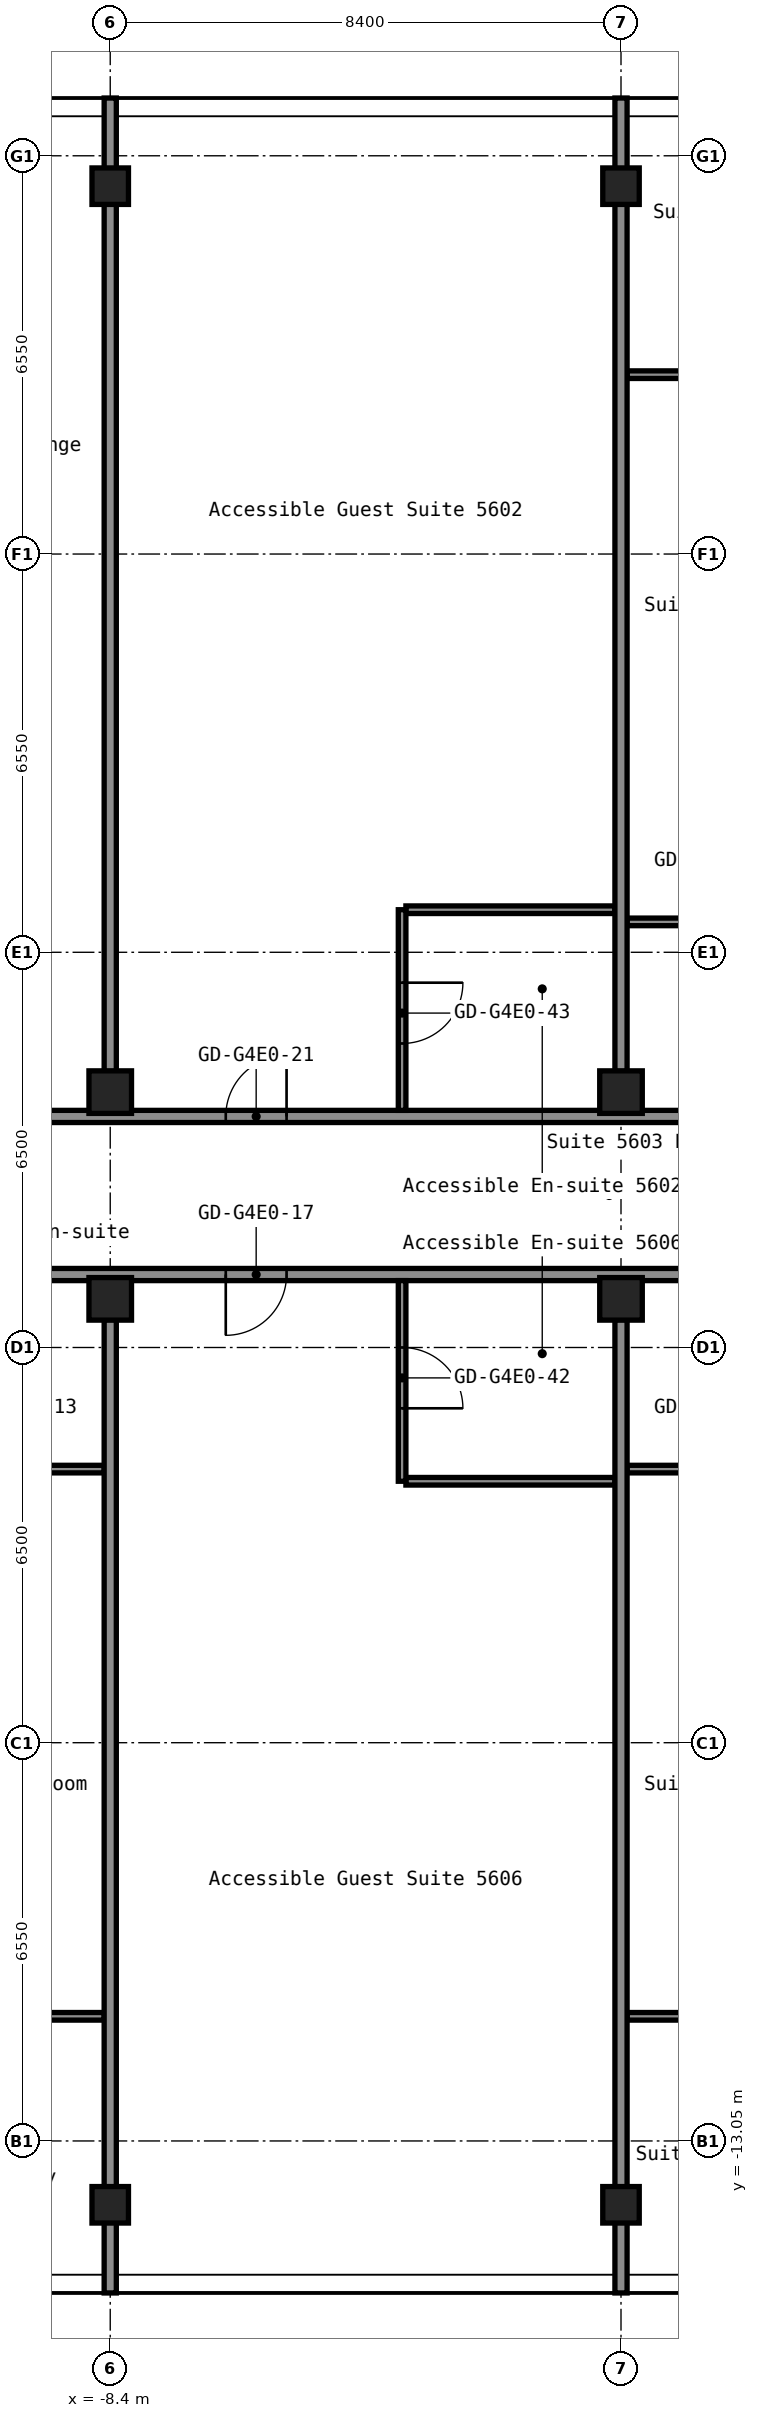
"""IFC4 building model, lengths in metres.
Left out: names, types, materials, properties, quantities, classifications, styles, units other than length and angle.
Written with IfcOpenShell. Run it as: python <this file> out.ifc"""

import sys

from ifc_helpers import new_model, si_unit, direction, frame, frame_2d, origin, origin_2d, place, context, subcontext, project, spatial, rectangle, hollow_rectangle, extrude, element, fill, save


model = new_model("IFC4")
c1 = context("Model", 3, precision=1e-05, world=origin(), true_north=direction((0.0, 1.0)))
c2 = subcontext(c1, "Body", "Model", "MODEL_VIEW")
j1 = project(units=[si_unit("LENGTHUNIT", "METRE"), si_unit("PLANEANGLEUNIT", "RADIAN")], contexts=[c1])
p1 = place(None, origin())
s1 = spatial("IfcSite", under=j1, at=p1, CompositionType="ELEMENT")
p2 = place(p1, origin())
s2 = spatial("IfcBuilding", under=s1, at=p2, CompositionType="ELEMENT")
p3 = place(p2, frame((0.0, 0.0, 199.4)))
s3 = spatial("IfcBuildingStorey", under=s2, at=p3, CompositionType="ELEMENT", Elevation=199.4)
p4 = place(p3, frame((-8.4, -14.1, 0.0), z_axis=(0.0, 0.0, 1.0), x_axis=(1.0, 0.0, 0.0)))
e1 = element("IfcColumn", 1, at=p4, inside=s3, PredefinedType="COLUMN", context=c2, shape_type="SweptSolid", body=[
    extrude(hollow_rectangle(XDim=0.6, YDim=0.6, WallThickness=0.025, InnerFilletRadius=0.038, OuterFilletRadius=0.062, at=origin_2d()), origin(), (0.0, 0.0, 1.0), 2.75),
])
for number, where, z_axis, x_axis in (
    (2, (-8.4, 0.8, 0.0), (0.0, 0.0, 1.0), (1.0, 0.0, 0.0)),
    (3, (-8.4, 4.2, 0.0), (0.0, 0.0, 1.0), (1.0, 0.0, 0.0)),
):
    element("IfcColumn", number, at=place(p3, frame(where, z_axis=z_axis, x_axis=x_axis)), inside=s3, PredefinedType="COLUMN", context=c2, shape_type="SweptSolid", body=[
        extrude(hollow_rectangle(XDim=0.7, YDim=0.7, WallThickness=0.028, at=origin_2d()), origin(), (0.0, 0.0, 1.0), 2.75),
    ])
for number, where, z_axis, x_axis in (
    (4, (-8.4, 19.1, 0.0), (0.0, 0.0, 1.0), (1.0, 0.0, 0.0)),
    (5, (0.0, -14.1, 0.0), (0.0, 0.0, 1.0), (1.0, 0.0, 0.0)),
):
    element("IfcColumn", number, at=place(p3, frame(where, z_axis=z_axis, x_axis=x_axis)), inside=s3, PredefinedType="COLUMN", context=c2, shape_type="SweptSolid", body=[
        extrude(hollow_rectangle(XDim=0.6, YDim=0.6, WallThickness=0.025, InnerFilletRadius=0.038, OuterFilletRadius=0.062, at=origin_2d()), origin(), (0.0, 0.0, 1.0), 2.75),
    ])
for number, where, z_axis, x_axis in (
    (6, (0.0, 0.8, 0.0), (0.0, 0.0, 1.0), (1.0, 0.0, 0.0)),
    (7, (0.0, 4.2, 0.0), (0.0, 0.0, 1.0), (1.0, 0.0, 0.0)),
):
    element("IfcColumn", number, at=place(p3, frame(where, z_axis=z_axis, x_axis=x_axis)), inside=s3, PredefinedType="COLUMN", context=c2, shape_type="SweptSolid", body=[
        extrude(hollow_rectangle(XDim=0.7, YDim=0.7, WallThickness=0.028, at=origin_2d()), origin(), (0.0, 0.0, 1.0), 2.75),
    ])
p5 = place(p3, frame((0.0, 19.1, 0.0), z_axis=(0.0, 0.0, 1.0), x_axis=(1.0, 0.0, 0.0)))
e8 = element("IfcColumn", 8, at=p5, inside=s3, PredefinedType="COLUMN", context=c2, shape_type="SweptSolid", body=[
    extrude(hollow_rectangle(XDim=0.6, YDim=0.6, WallThickness=0.025, InnerFilletRadius=0.038, OuterFilletRadius=0.062, at=origin_2d()), origin(), (0.0, 0.0, 1.0), 2.75),
])
p6 = place(p3, frame((-12.538, -11.0, 0.0), z_axis=(0.0, 0.0, 1.0), x_axis=(1.0, 0.0, 0.0)))
e9 = element("IfcWall", 9, at=p6, inside=s3, PredefinedType="PARTITIONING", context=c2, shape_type="SweptSolid", body=[
    extrude(rectangle(XDim=4.038, YDim=0.125, at=frame_2d((2.019, 0.0))), origin(), (0.0, 0.0, 1.0), 2.75),
])
p7 = place(p6, frame((1.587, 0.0, 0.0)))
e10 = element("IfcOpeningElement", 10, at=p7, cuts=e9, PredefinedType="OPENING", context=c2, shape_type="SweptSolid", body=[
    extrude(rectangle(XDim=0.9, YDim=2.1, at=frame_2d((0.45, 1.05))), frame((0.0, 0.073, 0.0), z_axis=(0.0, -1.0, 0.0), x_axis=(1.0, 0.0, 0.0)), (0.0, 0.0, 1.0), 0.145),
])
p8 = place(p3, frame((0.1, -11.0, 0.0), z_axis=(0.0, 0.0, 1.0), x_axis=(1.0, 0.0, 0.0)))
e11 = element("IfcWall", 11, at=p8, inside=s3, PredefinedType="PARTITIONING", context=c2, shape_type="SweptSolid", body=[
    extrude(rectangle(XDim=4.037, YDim=0.125, at=frame_2d((2.019, 0.0))), origin(), (0.0, 0.0, 1.0), 2.75),
])
p9 = place(p8, frame((1.55, 0.0, 0.0)))
e12 = element("IfcOpeningElement", 12, at=p9, cuts=e11, PredefinedType="OPENING", context=c2, shape_type="SweptSolid", body=[
    extrude(rectangle(XDim=0.9, YDim=2.1, at=frame_2d((0.45, 1.05))), frame((0.0, 0.073, 0.0), z_axis=(0.0, -1.0, 0.0), x_axis=(1.0, 0.0, 0.0)), (0.0, 0.0, 1.0), 0.145),
])
p10 = place(p3, frame((-3.538, -2.2, 0.0), z_axis=(0.0, 0.0, 1.0), x_axis=(1.0, 0.0, 0.0)))
e13 = element("IfcWall", 13, at=p10, inside=s3, PredefinedType="PARTITIONING", context=c2, shape_type="SweptSolid", body=[
    extrude(rectangle(XDim=3.438, YDim=0.125, at=frame_2d((1.719, 0.0))), origin(), (0.0, 0.0, 1.0), 2.75),
])
p11 = place(p3, frame((-11.337, -2.0, 0.0), z_axis=(0.0, 0.0, 1.0), x_axis=(1.0, 0.0, 0.0)))
e14 = element("IfcWall", 14, at=p11, inside=s3, PredefinedType="PARTITIONING", context=c2, shape_type="SweptSolid", body=[
    extrude(rectangle(XDim=2.837, YDim=0.125, at=frame_2d((1.419, 0.0))), origin(), (0.0, 0.0, 1.0), 2.75),
])
p12 = place(p11, frame((1.038, 0.0, 0.0)))
e15 = element("IfcOpeningElement", 15, at=p12, cuts=e14, PredefinedType="OPENING", context=c2, shape_type="SweptSolid", body=[
    extrude(rectangle(XDim=0.8, YDim=2.1, at=frame_2d((0.4, 1.05))), frame((0.0, 0.073, 0.0), z_axis=(0.0, -1.0, 0.0), x_axis=(1.0, 0.0, 0.0)), (0.0, 0.0, 1.0), 0.145),
])
p13 = place(p3, frame((0.1, -2.0, 0.0), z_axis=(0.0, 0.0, 1.0), x_axis=(1.0, 0.0, 0.0)))
e16 = element("IfcWall", 16, at=p13, inside=s3, PredefinedType="PARTITIONING", context=c2, shape_type="SweptSolid", body=[
    extrude(rectangle(XDim=2.837, YDim=0.125, at=frame_2d((1.419, 0.0))), origin(), (0.0, 0.0, 1.0), 2.75),
])
p14 = place(p13, frame((1.0, 0.0, 0.0)))
e17 = element("IfcOpeningElement", 17, at=p14, cuts=e16, PredefinedType="OPENING", context=c2, shape_type="SweptSolid", body=[
    extrude(rectangle(XDim=0.8, YDim=2.1, at=frame_2d((0.4, 1.05))), frame((0.0, 0.073, 0.0), z_axis=(0.0, -1.0, 0.0), x_axis=(1.0, 0.0, 0.0)), (0.0, 0.0, 1.0), 0.145),
])
p15 = place(p3, frame((-16.8, 1.2, 0.0), z_axis=(0.0, 0.0, 1.0), x_axis=(1.0, 0.0, 0.0)))
e18 = element("IfcWall", 18, at=p15, inside=s3, PredefinedType="PARTITIONING", context=c2, shape_type="SweptSolid", body=[
    extrude(rectangle(XDim=33.6, YDim=0.2, at=frame_2d((16.8, 0.0))), origin(), (0.0, 0.0, 1.0), 2.75),
])
p16 = place(p15, frame((1.6, 0.0, 0.0)))
e19 = element("IfcOpeningElement", 19, at=p16, cuts=e18, PredefinedType="OPENING", context=c2, shape_type="SweptSolid", body=[
    extrude(rectangle(XDim=1.0, YDim=2.1, at=frame_2d((0.5, 1.05))), frame((0.0, 0.11, 0.0), z_axis=(0.0, -1.0, 0.0), x_axis=(1.0, 0.0, 0.0)), (0.0, 0.0, 1.0), 0.22),
])
p17 = place(p15, frame((10.3, 0.0, 0.0)))
e20 = element("IfcOpeningElement", 20, at=p17, cuts=e18, PredefinedType="OPENING", context=c2, shape_type="SweptSolid", body=[
    extrude(rectangle(XDim=1.0, YDim=2.1, at=frame_2d((0.5, 1.05))), frame((0.0, 0.11, 0.0), z_axis=(0.0, -1.0, 0.0), x_axis=(1.0, 0.0, 0.0)), (0.0, 0.0, 1.0), 0.22),
])
p18 = place(p15, frame((22.6, 0.0, 0.0)))
e21 = element("IfcOpeningElement", 21, at=p18, cuts=e18, PredefinedType="OPENING", context=c2, shape_type="SweptSolid", body=[
    extrude(rectangle(XDim=1.0, YDim=2.1, at=frame_2d((0.5, 1.05))), frame((0.0, 0.11, 0.0), z_axis=(0.0, -1.0, 0.0), x_axis=(1.0, 0.0, 0.0)), (0.0, 0.0, 1.0), 0.22),
])
p19 = place(p15, frame((31.0, 0.0, 0.0)))
e22 = element("IfcOpeningElement", 22, at=p19, cuts=e18, PredefinedType="OPENING", context=c2, shape_type="SweptSolid", body=[
    extrude(rectangle(XDim=1.0, YDim=2.1, at=frame_2d((0.5, 1.05))), frame((0.0, 0.11, 0.0), z_axis=(0.0, -1.0, 0.0), x_axis=(1.0, 0.0, 0.0)), (0.0, 0.0, 1.0), 0.22),
])
p20 = place(p3, frame((-16.8, 3.8, 0.0), z_axis=(0.0, 0.0, 1.0), x_axis=(1.0, 0.0, 0.0)))
e23 = element("IfcWall", 23, at=p20, inside=s3, PredefinedType="PARTITIONING", context=c2, shape_type="SweptSolid", body=[
    extrude(rectangle(XDim=33.6, YDim=0.2, at=frame_2d((16.8, 0.0))), origin(), (0.0, 0.0, 1.0), 2.75),
])
p21 = place(p20, frame((5.8, 0.0, 0.0)))
e24 = element("IfcOpeningElement", 24, at=p21, cuts=e23, PredefinedType="OPENING", context=c2, shape_type="SweptSolid", body=[
    extrude(rectangle(XDim=1.0, YDim=2.1, at=frame_2d((0.5, 1.05))), frame((0.0, 0.11, 0.0), z_axis=(0.0, -1.0, 0.0), x_axis=(1.0, 0.0, 0.0)), (0.0, 0.0, 1.0), 0.22),
])
p22 = place(p20, frame((10.3, 0.0, 0.0)))
e25 = element("IfcOpeningElement", 25, at=p22, cuts=e23, PredefinedType="OPENING", context=c2, shape_type="SweptSolid", body=[
    extrude(rectangle(XDim=1.0, YDim=2.1, at=frame_2d((0.5, 1.05))), frame((0.0, 0.11, 0.0), z_axis=(0.0, -1.0, 0.0), x_axis=(1.0, 0.0, 0.0)), (0.0, 0.0, 1.0), 0.22),
])
p23 = place(p20, frame((22.6, 0.0, 0.0)))
e26 = element("IfcOpeningElement", 26, at=p23, cuts=e23, PredefinedType="OPENING", context=c2, shape_type="SweptSolid", body=[
    extrude(rectangle(XDim=1.0, YDim=2.1, at=frame_2d((0.5, 1.05))), frame((0.0, 0.11, 0.0), z_axis=(0.0, -1.0, 0.0), x_axis=(1.0, 0.0, 0.0)), (0.0, 0.0, 1.0), 0.22),
])
p24 = place(p20, frame((31.0, 0.0, 0.0)))
e27 = element("IfcOpeningElement", 27, at=p24, cuts=e23, PredefinedType="OPENING", context=c2, shape_type="SweptSolid", body=[
    extrude(rectangle(XDim=1.0, YDim=2.1, at=frame_2d((0.5, 1.05))), frame((0.0, 0.11, 0.0), z_axis=(0.0, -1.0, 0.0), x_axis=(1.0, 0.0, 0.0)), (0.0, 0.0, 1.0), 0.22),
])
p25 = place(p3, frame((0.1, 7.0, 0.0), z_axis=(0.0, 0.0, 1.0), x_axis=(1.0, 0.0, 0.0)))
e28 = element("IfcWall", 28, at=p25, inside=s3, PredefinedType="PARTITIONING", context=c2, shape_type="SweptSolid", body=[
    extrude(rectangle(XDim=2.837, YDim=0.125, at=frame_2d((1.419, 0.0))), origin(), (0.0, 0.0, 1.0), 2.75),
])
p26 = place(p25, frame((1.0, 0.0, 0.0)))
e29 = element("IfcOpeningElement", 29, at=p26, cuts=e28, PredefinedType="OPENING", context=c2, shape_type="SweptSolid", body=[
    extrude(rectangle(XDim=0.8, YDim=2.1, at=frame_2d((0.4, 1.05))), frame((0.0, 0.073, 0.0), z_axis=(0.0, -1.0, 0.0), x_axis=(1.0, 0.0, 0.0)), (0.0, 0.0, 1.0), 0.145),
])
p27 = place(p3, frame((-3.538, 7.2, 0.0), z_axis=(0.0, 0.0, 1.0), x_axis=(1.0, 0.0, 0.0)))
e30 = element("IfcWall", 30, at=p27, inside=s3, PredefinedType="PARTITIONING", context=c2, shape_type="SweptSolid", body=[
    extrude(rectangle(XDim=3.438, YDim=0.125, at=frame_2d((1.719, 0.0))), origin(), (0.0, 0.0, 1.0), 2.75),
])
p28 = place(p3, frame((0.1, 16.0, 0.0), z_axis=(0.0, 0.0, 1.0), x_axis=(1.0, 0.0, 0.0)))
e31 = element("IfcWall", 31, at=p28, inside=s3, PredefinedType="PARTITIONING", context=c2, shape_type="SweptSolid", body=[
    extrude(rectangle(XDim=4.037, YDim=0.125, at=frame_2d((2.019, 0.0))), origin(), (0.0, 0.0, 1.0), 2.75),
])
p29 = place(p28, frame((1.55, 0.0, 0.0)))
e32 = element("IfcOpeningElement", 32, at=p29, cuts=e31, PredefinedType="OPENING", context=c2, shape_type="SweptSolid", body=[
    extrude(rectangle(XDim=0.9, YDim=2.1, at=frame_2d((0.45, 1.05))), frame((0.0, 0.073, 0.0), z_axis=(0.0, -1.0, 0.0), x_axis=(1.0, 0.0, 0.0)), (0.0, 0.0, 1.0), 0.145),
])
for number, where, z_axis, x_axis in (
    (33, (-8.4, -15.55, 0.0), (0.0, 0.0, 1.0), (0.0, 1.0, 0.0)),
    (34, (-8.4, 4.54, 0.0), (0.0, 0.0, 1.0), (0.0, 1.0, 0.0)),
):
    element("IfcWall", number, at=place(p3, frame(where, z_axis=z_axis, x_axis=x_axis)), inside=s3, PredefinedType="PARTITIONING", context=c2, shape_type="SweptSolid", body=[
        extrude(rectangle(XDim=16.01, YDim=0.2, at=frame_2d((8.005, 0.0))), origin(), (0.0, 0.0, 1.0), 2.75),
    ])
p30 = place(p3, frame((-3.6, -2.2, 0.0), z_axis=(0.0, 0.0, 1.0), x_axis=(0.0, 1.0, 0.0)))
e35 = element("IfcWall", 35, at=p30, inside=s3, PredefinedType="PARTITIONING", context=c2, shape_type="SweptSolid", body=[
    extrude(rectangle(XDim=3.3, YDim=0.125, at=frame_2d((1.65, 0.0))), origin(), (0.0, 0.0, 1.0), 2.75),
])
p31 = place(p30, frame((1.2, 0.0, 0.0)))
e36 = element("IfcOpeningElement", 36, at=p31, cuts=e35, PredefinedType="OPENING", context=c2, shape_type="SweptSolid", body=[
    extrude(rectangle(XDim=1.0, YDim=2.1, at=frame_2d((0.5, 1.05))), frame((0.0, 0.073, 0.0), z_axis=(0.0, -1.0, 0.0), x_axis=(1.0, 0.0, 0.0)), (0.0, 0.0, 1.0), 0.145),
])
p32 = place(p3, frame((-3.6, 3.9, 0.0), z_axis=(0.0, 0.0, 1.0), x_axis=(0.0, 1.0, 0.0)))
e37 = element("IfcWall", 37, at=p32, inside=s3, PredefinedType="PARTITIONING", context=c2, shape_type="SweptSolid", body=[
    extrude(rectangle(XDim=3.3, YDim=0.125, at=frame_2d((1.65, 0.0))), origin(), (0.0, 0.0, 1.0), 2.75),
])
p33 = place(p32, frame((1.1, 0.0, 0.0)))
e38 = element("IfcOpeningElement", 38, at=p33, cuts=e37, PredefinedType="OPENING", context=c2, shape_type="SweptSolid", body=[
    extrude(rectangle(XDim=1.0, YDim=2.1, at=frame_2d((0.5, 1.05))), frame((0.0, 0.073, 0.0), z_axis=(0.0, -1.0, 0.0), x_axis=(1.0, 0.0, 0.0)), (0.0, 0.0, 1.0), 0.145),
])
for number, where, z_axis, x_axis in (
    (39, (0.0, -15.55, 0.0), (0.0, 0.0, 1.0), (0.0, 1.0, 0.0)),
    (40, (0.0, 4.54, 0.0), (0.0, 0.0, 1.0), (0.0, 1.0, 0.0)),
):
    element("IfcWall", number, at=place(p3, frame(where, z_axis=z_axis, x_axis=x_axis)), inside=s3, PredefinedType="PARTITIONING", context=c2, shape_type="SweptSolid", body=[
        extrude(rectangle(XDim=16.01, YDim=0.2, at=frame_2d((8.005, 0.0))), origin(), (0.0, 0.0, 1.0), 2.75),
    ])
p34 = place(p17, origin())
e41 = element("IfcDoor", 41, at=p34, inside=s3, OperationType="SINGLE_SWING_LEFT", PredefinedType="DOOR", context=c2, shape_type="SweptSolid", body=[
    extrude(rectangle(XDim=1.0, YDim=2.1, at=frame_2d((0.5, 1.05))), frame((0.0, 0.025, 0.0), z_axis=(0.0, -1.0, 0.0), x_axis=(1.0, 0.0, 0.0)), (0.0, 0.0, 1.0), 0.05),
])
fill(e20, e41)
p35 = place(p22, origin())
e42 = element("IfcDoor", 42, at=p35, inside=s3, OperationType="SINGLE_SWING_LEFT", PredefinedType="DOOR", context=c2, shape_type="SweptSolid", body=[
    extrude(rectangle(XDim=1.0, YDim=2.1, at=frame_2d((0.5, 1.05))), frame((0.0, 0.025, 0.0), z_axis=(0.0, -1.0, 0.0), x_axis=(1.0, 0.0, 0.0)), (0.0, 0.0, 1.0), 0.05),
])
fill(e25, e42)
p36 = place(p31, origin())
e43 = element("IfcDoor", 43, at=p36, inside=s3, OperationType="SINGLE_SWING_LEFT", PredefinedType="DOOR", context=c2, shape_type="SweptSolid", body=[
    extrude(rectangle(XDim=1.0, YDim=2.1, at=frame_2d((0.5, 1.05))), frame((0.0, 0.025, 0.0), z_axis=(0.0, -1.0, 0.0), x_axis=(1.0, 0.0, 0.0)), (0.0, 0.0, 1.0), 0.05),
])
fill(e36, e43)
p37 = place(p33, origin())
e44 = element("IfcDoor", 44, at=p37, inside=s3, OperationType="SINGLE_SWING_RIGHT", PredefinedType="DOOR", context=c2, shape_type="SweptSolid", body=[
    extrude(rectangle(XDim=1.0, YDim=2.1, at=frame_2d((0.5, 1.05))), frame((0.0, 0.025, 0.0), z_axis=(0.0, -1.0, 0.0), x_axis=(1.0, 0.0, 0.0)), (0.0, 0.0, 1.0), 0.05),
])
fill(e38, e44)
save(model, sys.argv[1])
